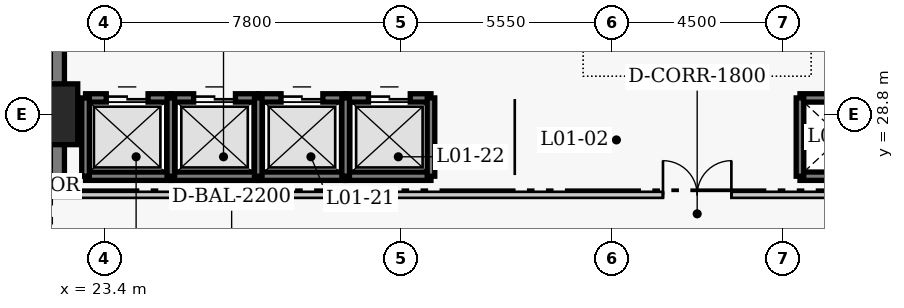
"""IFC4 building model, lengths in metres.
Left out: names, types, materials, properties, quantities, classifications, styles, units other than length and angle.
Written with IfcOpenShell. Run it as: python <this file> out.ifc"""

import sys

from ifc_helpers import new_model, si_unit, direction, frame, frame_2d, origin, origin_2d, place, context, subcontext, project, spatial, rectangle, extrude, element, fill, save


model = new_model("IFC4")
c1 = context("Model", 3, precision=1e-05, world=origin(), true_north=direction((0.0, 1.0)))
c2 = subcontext(c1, "Body", "Model", "MODEL_VIEW")
j1 = project(units=[si_unit("LENGTHUNIT", "METRE"), si_unit("PLANEANGLEUNIT", "RADIAN")], contexts=[c1])
p1 = place(None, origin())
s1 = spatial("IfcSite", under=j1, at=p1, CompositionType="ELEMENT")
p2 = place(p1, origin())
s2 = spatial("IfcBuilding", under=s1, at=p2, CompositionType="ELEMENT")
p3 = place(p2, frame((0.0, 0.0, 5.4)))
s3 = spatial("IfcBuildingStorey", under=s2, at=p3, CompositionType="ELEMENT", Elevation=5.4)
p4 = place(p3, frame((21.9, 27.05, 0.0), z_axis=(0.0, 0.0, 1.0), x_axis=(0.0, 1.0, 0.0)))
e1 = element("IfcWall", 1, at=p4, inside=s3, PredefinedType="SHEAR", context=c2, shape_type="SweptSolid", body=[
    extrude(rectangle(XDim=13.72, YDim=0.9, at=frame_2d((6.86, 0.0))), origin(), (0.0, 0.0, 1.0), 5.0),
])
p5 = place(p3, frame((21.9, 28.8, 0.0), z_axis=(0.0, 0.0, 1.0), x_axis=(1.0, 0.0, 0.0)))
e2 = element("IfcColumn", 2, at=p5, inside=s3, PredefinedType="COLUMN", context=c2, shape_type="SweptSolid", body=[
    extrude(rectangle(XDim=1.6, YDim=1.6, at=origin_2d()), origin(), (0.0, 0.0, 1.0), 5.0),
])
p6 = place(p3, frame((22.905, 29.23, 0.0), z_axis=(0.0, 0.0, 1.0), x_axis=(1.0, 0.0, 0.0)))
e3 = element("IfcWall", 3, at=p6, inside=s3, PredefinedType="SHEAR", context=c2, shape_type="SweptSolid", body=[
    extrude(rectangle(XDim=2.245, YDim=0.22, at=frame_2d((1.123, 0.0))), origin(), (0.0, 0.0, 1.0), 5.0),
])
p7 = place(p6, frame((0.545, 0.0, 0.0)))
e4 = element("IfcOpeningElement", 4, at=p7, cuts=e3, PredefinedType="OPENING", context=c2, shape_type="SweptSolid", body=[
    extrude(rectangle(XDim=1.1, YDim=2.15, at=frame_2d((0.55, 1.075))), frame((0.0, 0.12, 0.0), z_axis=(0.0, -1.0, 0.0), x_axis=(1.0, 0.0, 0.0)), (0.0, 0.0, 1.0), 0.24),
])
p8 = place(p3, frame((22.905, 27.17, 0.0), z_axis=(0.0, 0.0, 1.0), x_axis=(1.0, 0.0, 0.0)))
e5 = element("IfcWall", 5, at=p8, inside=s3, PredefinedType="SHEAR", context=c2, shape_type="SweptSolid", body=[
    extrude(rectangle(XDim=2.245, YDim=0.22, at=frame_2d((1.123, 0.0))), origin(), (0.0, 0.0, 1.0), 5.0),
])
p9 = place(p3, frame((22.905, 27.17, 0.0), z_axis=(0.0, 0.0, 1.0), x_axis=(0.0, 1.0, 0.0)))
e6 = element("IfcWall", 6, at=p9, inside=s3, PredefinedType="SHEAR", context=c2, shape_type="SweptSolid", body=[
    extrude(rectangle(XDim=2.06, YDim=0.2, at=frame_2d((1.03, 0.0))), origin(), (0.0, 0.0, 1.0), 5.0),
])
p10 = place(p3, frame((25.15, 29.23, 0.0), z_axis=(0.0, 0.0, 1.0), x_axis=(1.0, 0.0, 0.0)))
e7 = element("IfcWall", 7, at=p10, inside=s3, PredefinedType="SHEAR", context=c2, shape_type="SweptSolid", body=[
    extrude(rectangle(XDim=2.3, YDim=0.22, at=frame_2d((1.15, 0.0))), origin(), (0.0, 0.0, 1.0), 5.0),
])
p11 = place(p10, frame((0.6, 0.0, 0.0)))
e8 = element("IfcOpeningElement", 8, at=p11, cuts=e7, PredefinedType="OPENING", context=c2, shape_type="SweptSolid", body=[
    extrude(rectangle(XDim=1.1, YDim=2.15, at=frame_2d((0.55, 1.075))), frame((0.0, 0.12, 0.0), z_axis=(0.0, -1.0, 0.0), x_axis=(1.0, 0.0, 0.0)), (0.0, 0.0, 1.0), 0.24),
])
p12 = place(p3, frame((25.15, 27.17, 0.0), z_axis=(0.0, 0.0, 1.0), x_axis=(1.0, 0.0, 0.0)))
e9 = element("IfcWall", 9, at=p12, inside=s3, PredefinedType="SHEAR", context=c2, shape_type="SweptSolid", body=[
    extrude(rectangle(XDim=2.3, YDim=0.22, at=frame_2d((1.15, 0.0))), origin(), (0.0, 0.0, 1.0), 5.0),
])
p13 = place(p3, frame((25.15, 27.17, 0.0), z_axis=(0.0, 0.0, 1.0), x_axis=(0.0, 1.0, 0.0)))
e10 = element("IfcWall", 10, at=p13, inside=s3, PredefinedType="SHEAR", context=c2, shape_type="SweptSolid", body=[
    extrude(rectangle(XDim=2.06, YDim=0.2, at=frame_2d((1.03, 0.0))), origin(), (0.0, 0.0, 1.0), 5.0),
])
p14 = place(p3, frame((27.45, 29.23, 0.0), z_axis=(0.0, 0.0, 1.0), x_axis=(1.0, 0.0, 0.0)))
e11 = element("IfcWall", 11, at=p14, inside=s3, PredefinedType="SHEAR", context=c2, shape_type="SweptSolid", body=[
    extrude(rectangle(XDim=2.3, YDim=0.22, at=frame_2d((1.15, 0.0))), origin(), (0.0, 0.0, 1.0), 5.0),
])
p15 = place(p14, frame((0.6, 0.0, 0.0)))
e12 = element("IfcOpeningElement", 12, at=p15, cuts=e11, PredefinedType="OPENING", context=c2, shape_type="SweptSolid", body=[
    extrude(rectangle(XDim=1.1, YDim=2.15, at=frame_2d((0.55, 1.075))), frame((0.0, 0.12, 0.0), z_axis=(0.0, -1.0, 0.0), x_axis=(1.0, 0.0, 0.0)), (0.0, 0.0, 1.0), 0.24),
])
p16 = place(p3, frame((27.45, 27.17, 0.0), z_axis=(0.0, 0.0, 1.0), x_axis=(1.0, 0.0, 0.0)))
e13 = element("IfcWall", 13, at=p16, inside=s3, PredefinedType="SHEAR", context=c2, shape_type="SweptSolid", body=[
    extrude(rectangle(XDim=2.3, YDim=0.22, at=frame_2d((1.15, 0.0))), origin(), (0.0, 0.0, 1.0), 5.0),
])
p17 = place(p3, frame((27.45, 27.17, 0.0), z_axis=(0.0, 0.0, 1.0), x_axis=(0.0, 1.0, 0.0)))
e14 = element("IfcWall", 14, at=p17, inside=s3, PredefinedType="SHEAR", context=c2, shape_type="SweptSolid", body=[
    extrude(rectangle(XDim=2.06, YDim=0.2, at=frame_2d((1.03, 0.0))), origin(), (0.0, 0.0, 1.0), 5.0),
])
p18 = place(p3, frame((29.75, 29.23, 0.0), z_axis=(0.0, 0.0, 1.0), x_axis=(1.0, 0.0, 0.0)))
e15 = element("IfcWall", 15, at=p18, inside=s3, PredefinedType="SHEAR", context=c2, shape_type="SweptSolid", body=[
    extrude(rectangle(XDim=2.245, YDim=0.22, at=frame_2d((1.123, 0.0))), origin(), (0.0, 0.0, 1.0), 5.0),
])
p19 = place(p18, frame((0.6, 0.0, 0.0)))
e16 = element("IfcOpeningElement", 16, at=p19, cuts=e15, PredefinedType="OPENING", context=c2, shape_type="SweptSolid", body=[
    extrude(rectangle(XDim=1.1, YDim=2.15, at=frame_2d((0.55, 1.075))), frame((0.0, 0.12, 0.0), z_axis=(0.0, -1.0, 0.0), x_axis=(1.0, 0.0, 0.0)), (0.0, 0.0, 1.0), 0.24),
])
p20 = place(p3, frame((29.75, 27.17, 0.0), z_axis=(0.0, 0.0, 1.0), x_axis=(1.0, 0.0, 0.0)))
e17 = element("IfcWall", 17, at=p20, inside=s3, PredefinedType="SHEAR", context=c2, shape_type="SweptSolid", body=[
    extrude(rectangle(XDim=2.245, YDim=0.22, at=frame_2d((1.123, 0.0))), origin(), (0.0, 0.0, 1.0), 5.0),
])
for number, where, z_axis, x_axis in (
    (18, (29.75, 27.17, 0.0), (0.0, 0.0, 1.0), (0.0, 1.0, 0.0)),
    (19, (31.995, 27.17, 0.0), (0.0, 0.0, 1.0), (0.0, 1.0, 0.0)),
):
    element("IfcWall", number, at=place(p3, frame(where, z_axis=z_axis, x_axis=x_axis)), inside=s3, PredefinedType="SHEAR", context=c2, shape_type="SweptSolid", body=[
        extrude(rectangle(XDim=2.06, YDim=0.2, at=frame_2d((1.03, 0.0))), origin(), (0.0, 0.0, 1.0), 5.0),
    ])
for number, where, z_axis, x_axis in (
    (20, (41.705, 29.23, 0.0), (0.0, 0.0, 1.0), (1.0, 0.0, 0.0)),
    (21, (41.705, 27.17, 0.0), (0.0, 0.0, 1.0), (1.0, 0.0, 0.0)),
):
    element("IfcWall", number, at=place(p3, frame(where, z_axis=z_axis, x_axis=x_axis)), inside=s3, PredefinedType="SHEAR", context=c2, shape_type="SweptSolid", body=[
        extrude(rectangle(XDim=2.245, YDim=0.22, at=frame_2d((1.123, 0.0))), origin(), (0.0, 0.0, 1.0), 5.0),
    ])
p21 = place(p3, frame((41.705, 27.17, 0.0), z_axis=(0.0, 0.0, 1.0), x_axis=(0.0, 1.0, 0.0)))
e22 = element("IfcWall", 22, at=p21, inside=s3, PredefinedType="SHEAR", context=c2, shape_type="SweptSolid", body=[
    extrude(rectangle(XDim=2.06, YDim=0.2, at=frame_2d((1.03, 0.0))), origin(), (0.0, 0.0, 1.0), 5.0),
])
p22 = place(p3, frame((-2.98, 26.68, 0.0), z_axis=(0.0, 0.0, 1.0), x_axis=(1.0, 0.0, 0.0)))
e23 = element("IfcWall", 23, at=p22, inside=s3, PredefinedType="PARTITIONING", context=c2, shape_type="SweptSolid", body=[
    extrude(rectangle(XDim=83.96, YDim=0.16, at=frame_2d((41.98, 0.0))), origin(), (0.0, 0.0, 1.0), 4.65),
])
p23 = place(p22, frame((41.08, 0.0, 0.0)))
e24 = element("IfcOpeningElement", 24, at=p23, cuts=e23, PredefinedType="OPENING", context=c2, shape_type="SweptSolid", body=[
    extrude(rectangle(XDim=1.8, YDim=2.2, at=frame_2d((0.9, 1.1))), frame((0.0, 0.09, 0.0), z_axis=(0.0, -1.0, 0.0), x_axis=(1.0, 0.0, 0.0)), (0.0, 0.0, 1.0), 0.18),
])
p24 = place(p22, frame((4.042, 0.0, 0.0)))
e25 = element("IfcOpeningElement", 25, at=p24, cuts=e23, PredefinedType="OPENING", context=c2, shape_type="SweptSolid", body=[
    extrude(rectangle(XDim=1.8, YDim=2.2, at=frame_2d((0.9, 1.1))), frame((0.0, 0.09, 0.0), z_axis=(0.0, -1.0, 0.0), x_axis=(1.0, 0.0, 0.0)), (0.0, 0.0, 1.0), 0.18),
])
p25 = place(p22, frame((61.48, 0.0, 0.0)))
e26 = element("IfcOpeningElement", 26, at=p25, cuts=e23, PredefinedType="OPENING", context=c2, shape_type="SweptSolid", body=[
    extrude(rectangle(XDim=1.8, YDim=2.2, at=frame_2d((0.9, 1.1))), frame((0.0, 0.09, 0.0), z_axis=(0.0, -1.0, 0.0), x_axis=(1.0, 0.0, 0.0)), (0.0, 0.0, 1.0), 0.18),
])
p26 = place(p7, origin())
e27 = element("IfcDoor", 27, at=p26, inside=s3, OperationType="DOUBLE_DOOR_SLIDING", PredefinedType="DOOR", context=c2, shape_type="SweptSolid", body=[
    extrude(rectangle(XDim=1.1, YDim=2.15, at=frame_2d((0.55, 1.075))), frame((0.0, 0.025, 0.0), z_axis=(0.0, -1.0, 0.0), x_axis=(1.0, 0.0, 0.0)), (0.0, 0.0, 1.0), 0.05),
])
fill(e4, e27)
p27 = place(p11, origin())
e28 = element("IfcDoor", 28, at=p27, inside=s3, OperationType="DOUBLE_DOOR_SLIDING", PredefinedType="DOOR", context=c2, shape_type="SweptSolid", body=[
    extrude(rectangle(XDim=1.1, YDim=2.15, at=frame_2d((0.55, 1.075))), frame((0.0, 0.025, 0.0), z_axis=(0.0, -1.0, 0.0), x_axis=(1.0, 0.0, 0.0)), (0.0, 0.0, 1.0), 0.05),
])
fill(e8, e28)
p28 = place(p15, origin())
e29 = element("IfcDoor", 29, at=p28, inside=s3, OperationType="DOUBLE_DOOR_SLIDING", PredefinedType="DOOR", context=c2, shape_type="SweptSolid", body=[
    extrude(rectangle(XDim=1.1, YDim=2.15, at=frame_2d((0.55, 1.075))), frame((0.0, 0.025, 0.0), z_axis=(0.0, -1.0, 0.0), x_axis=(1.0, 0.0, 0.0)), (0.0, 0.0, 1.0), 0.05),
])
fill(e12, e29)
p29 = place(p19, origin())
e30 = element("IfcDoor", 30, at=p29, inside=s3, OperationType="DOUBLE_DOOR_SLIDING", PredefinedType="DOOR", context=c2, shape_type="SweptSolid", body=[
    extrude(rectangle(XDim=1.1, YDim=2.15, at=frame_2d((0.55, 1.075))), frame((0.0, 0.025, 0.0), z_axis=(0.0, -1.0, 0.0), x_axis=(1.0, 0.0, 0.0)), (0.0, 0.0, 1.0), 0.05),
])
fill(e16, e30)
p30 = place(p23, origin())
e31 = element("IfcDoor", 31, at=p30, inside=s3, OperationType="DOUBLE_DOOR_SINGLE_SWING", PredefinedType="DOOR", context=c2, shape_type="SweptSolid", body=[
    extrude(rectangle(XDim=1.8, YDim=2.2, at=frame_2d((0.9, 1.1))), frame((0.0, 0.025, 0.0), z_axis=(0.0, -1.0, 0.0), x_axis=(1.0, 0.0, 0.0)), (0.0, 0.0, 1.0), 0.05),
])
fill(e24, e31)
save(model, sys.argv[1])
